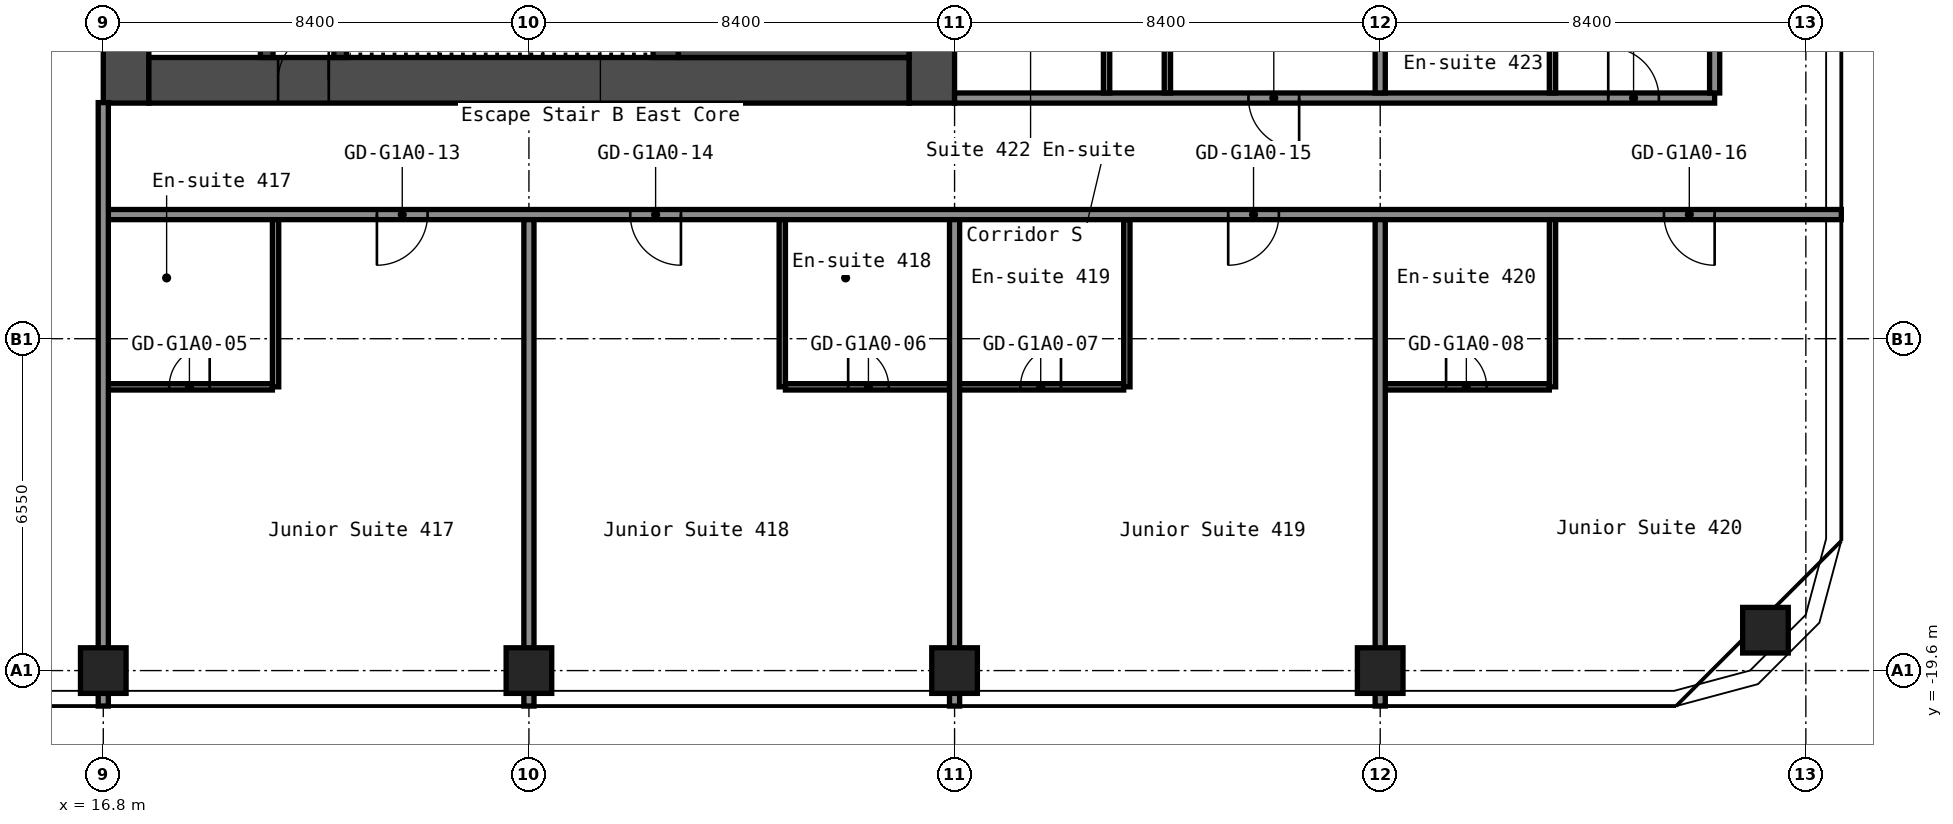
"""IFC4 building model, lengths in metres.
Left out: names, types, materials, properties, quantities, classifications, styles, units other than length and angle.
Written with IfcOpenShell. Run it as: python <this file> out.ifc"""

import sys

from ifc_helpers import new_model, si_unit, direction, frame, frame_2d, origin, origin_2d, place, context, subcontext, project, spatial, rectangle, hollow_rectangle, extrude, element, fill, save


model = new_model("IFC4")
c1 = context("Model", 3, precision=1e-05, world=origin(), true_north=direction((0.0, 1.0)))
c2 = subcontext(c1, "Body", "Model", "MODEL_VIEW")
j1 = project(units=[si_unit("LENGTHUNIT", "METRE"), si_unit("PLANEANGLEUNIT", "RADIAN")], contexts=[c1])
p1 = place(None, origin())
s1 = spatial("IfcSite", under=j1, at=p1, CompositionType="ELEMENT")
p2 = place(p1, origin())
s2 = spatial("IfcBuilding", under=s1, at=p2, CompositionType="ELEMENT")
p3 = place(p2, frame((0.0, 0.0, 19.8)))
s3 = spatial("IfcBuildingStorey", under=s2, at=p3, CompositionType="ELEMENT", Elevation=19.8)
for number, where, z_axis, x_axis in (
    (1, (16.8, -19.6, 0.0), (0.0, 0.0, 1.0), (1.0, 0.0, 0.0)),
    (2, (25.2, -19.6, 0.0), (0.0, 0.0, 1.0), (1.0, 0.0, 0.0)),
    (3, (33.6, -19.6, 0.0), (0.0, 0.0, 1.0), (1.0, 0.0, 0.0)),
    (4, (42.0, -19.6, 0.0), (0.0, 0.0, 1.0), (1.0, 0.0, 0.0)),
    (5, (49.603, -18.803, 0.0), (0.0, 0.0, 1.0), (1.0, 0.0, 0.0)),
):
    element("IfcColumn", number, at=place(p3, frame(where, z_axis=z_axis, x_axis=x_axis)), inside=s3, PredefinedType="COLUMN", context=c2, shape_type="SweptSolid", body=[
        extrude(hollow_rectangle(XDim=0.9, YDim=0.9, WallThickness=0.036, at=origin_2d()), origin(), (0.0, 0.0, 1.0), 2.8),
    ])
p4 = place(p3, frame((17.25, -8.4, 0.0), z_axis=(0.0, 0.0, 1.0), x_axis=(0.0, 1.0, 0.0)))
e6 = element("IfcWall", 6, at=p4, inside=s3, PredefinedType="SHEAR", context=c2, shape_type="SweptSolid", body=[
    extrude(rectangle(XDim=16.8, YDim=0.9, at=frame_2d((8.4, 0.0))), origin(), (0.0, 0.0, 1.0), 2.8),
])
p5 = place(p4, frame((12.75, 0.0, 0.0)))
e7 = element("IfcOpeningElement", 7, at=p5, cuts=e6, PredefinedType="OPENING", context=c2, shape_type="SweptSolid", body=[
    extrude(rectangle(XDim=1.2, YDim=2.1, at=frame_2d((0.6, 1.05))), frame((0.0, 0.46, 0.0), z_axis=(0.0, -1.0, 0.0), x_axis=(1.0, 0.0, 0.0)), (0.0, 0.0, 1.0), 0.92),
])
p6 = place(p4, frame((2.85, 0.0, 0.0)))
e8 = element("IfcOpeningElement", 8, at=p6, cuts=e6, PredefinedType="OPENING", context=c2, shape_type="SweptSolid", body=[
    extrude(rectangle(XDim=1.2, YDim=2.1, at=frame_2d((0.6, 1.05))), frame((0.0, 0.46, 0.0), z_axis=(0.0, -1.0, 0.0), x_axis=(1.0, 0.0, 0.0)), (0.0, 0.0, 1.0), 0.92),
])
p7 = place(p3, frame((33.15, -8.4, 0.0), z_axis=(0.0, 0.0, 1.0), x_axis=(0.0, 1.0, 0.0)))
e9 = element("IfcWall", 9, at=p7, inside=s3, PredefinedType="SHEAR", context=c2, shape_type="SweptSolid", body=[
    extrude(rectangle(XDim=16.8, YDim=0.9, at=frame_2d((8.4, 0.0))), origin(), (0.0, 0.0, 1.0), 2.8),
])
p8 = place(p3, frame((17.7, -7.95, 0.0), z_axis=(0.0, 0.0, 1.0), x_axis=(1.0, 0.0, 0.0)))
e10 = element("IfcWall", 10, at=p8, inside=s3, PredefinedType="SHEAR", context=c2, shape_type="SweptSolid", body=[
    extrude(rectangle(XDim=15.0, YDim=0.9, at=frame_2d((7.5, 0.0))), origin(), (0.0, 0.0, 1.0), 2.8),
])
p9 = place(p8, frame((2.55, 0.0, 0.0)))
e11 = element("IfcOpeningElement", 11, at=p9, cuts=e10, PredefinedType="OPENING", context=c2, shape_type="SweptSolid", body=[
    extrude(rectangle(XDim=1.0, YDim=2.1, at=frame_2d((0.5, 1.05))), frame((0.0, 0.46, 0.0), z_axis=(0.0, -1.0, 0.0), x_axis=(1.0, 0.0, 0.0)), (0.0, 0.0, 1.0), 0.92),
])
p10 = place(p3, frame((20.025, -7.5, 0.0), z_axis=(0.0, 0.0, 1.0), x_axis=(0.0, 1.0, 0.0)))
e12 = element("IfcWall", 12, at=p10, inside=s3, PredefinedType="SHEAR", context=c2, shape_type="SweptSolid", body=[
    extrude(rectangle(XDim=6.3, YDim=0.25, at=frame_2d((3.15, 0.0))), origin(), (0.0, 0.0, 1.0), 2.8),
])
p11 = place(p10, frame((2.4, 0.0, 0.0)))
e13 = element("IfcOpeningElement", 13, at=p11, cuts=e12, PredefinedType="OPENING", context=c2, shape_type="SweptSolid", body=[
    extrude(rectangle(XDim=1.0, YDim=2.1, at=frame_2d((0.5, 1.05))), frame((0.0, 0.135, 0.0), z_axis=(0.0, -1.0, 0.0), x_axis=(1.0, 0.0, 0.0)), (0.0, 0.0, 1.0), 0.27),
])
p12 = place(p3, frame((21.475, -7.5, 0.0), z_axis=(0.0, 0.0, 1.0), x_axis=(0.0, 1.0, 0.0)))
e14 = element("IfcWall", 14, at=p12, inside=s3, PredefinedType="SHEAR", context=c2, shape_type="SweptSolid", body=[
    extrude(rectangle(XDim=3.75, YDim=0.25, at=frame_2d((1.875, 0.0))), origin(), (0.0, 0.0, 1.0), 2.8),
])
p13 = place(p12, frame((1.3, 0.0, 0.0)))
e15 = element("IfcOpeningElement", 15, at=p13, cuts=e14, PredefinedType="OPENING", context=c2, shape_type="SweptSolid", body=[
    extrude(rectangle(XDim=1.2, YDim=2.1, at=frame_2d((0.6, 1.05))), frame((0.0, 0.135, 0.0), z_axis=(0.0, -1.0, 0.0), x_axis=(1.0, 0.0, 0.0)), (0.0, 0.0, 1.0), 0.27),
])
p14 = place(p3, frame((27.9, -7.5, 0.0), z_axis=(0.0, 0.0, 1.0), x_axis=(0.0, 1.0, 0.0)))
e16 = element("IfcWall", 16, at=p14, inside=s3, PredefinedType="SHEAR", context=c2, shape_type="SweptSolid", body=[
    extrude(rectangle(XDim=3.75, YDim=0.5, at=frame_2d((1.875, 0.0))), origin(), (0.0, 0.0, 1.0), 2.8),
])
p15 = place(p3, frame((28.15, -6.75, 0.0), z_axis=(0.0, 0.0, 1.0), x_axis=(1.0, 0.0, 0.0)))
e17 = element("IfcWall", 17, at=p15, inside=s3, PredefinedType="SHEAR", context=c2, shape_type="SweptSolid", body=[
    extrude(rectangle(XDim=4.55, YDim=1.5, at=frame_2d((2.275, 0.0))), origin(), (0.0, 0.0, 1.0), 2.8),
])
p16 = place(p3, frame((16.9, -14.0, 0.0), z_axis=(0.0, 0.0, 1.0), x_axis=(1.0, 0.0, 0.0)))
e18 = element("IfcWall", 18, at=p16, inside=s3, PredefinedType="PARTITIONING", context=c2, shape_type="SweptSolid", body=[
    extrude(rectangle(XDim=3.238, YDim=0.125, at=frame_2d((1.619, 0.0))), origin(), (0.0, 0.0, 1.0), 2.8),
])
p17 = place(p16, frame((1.2, 0.0, 0.0)))
e19 = element("IfcOpeningElement", 19, at=p17, cuts=e18, PredefinedType="OPENING", context=c2, shape_type="SweptSolid", body=[
    extrude(rectangle(XDim=0.8, YDim=2.1, at=frame_2d((0.4, 1.05))), frame((0.0, 0.073, 0.0), z_axis=(0.0, -1.0, 0.0), x_axis=(1.0, 0.0, 0.0)), (0.0, 0.0, 1.0), 0.145),
])
p18 = place(p3, frame((30.262, -14.0, 0.0), z_axis=(0.0, 0.0, 1.0), x_axis=(1.0, 0.0, 0.0)))
e20 = element("IfcWall", 20, at=p18, inside=s3, PredefinedType="PARTITIONING", context=c2, shape_type="SweptSolid", body=[
    extrude(rectangle(XDim=6.675, YDim=0.125, at=frame_2d((3.337, 0.0))), origin(), (0.0, 0.0, 1.0), 2.8),
])
p19 = place(p18, frame((1.238, 0.0, 0.0)))
e21 = element("IfcOpeningElement", 21, at=p19, cuts=e20, PredefinedType="OPENING", context=c2, shape_type="SweptSolid", body=[
    extrude(rectangle(XDim=0.8, YDim=2.1, at=frame_2d((0.4, 1.05))), frame((0.0, 0.073, 0.0), z_axis=(0.0, -1.0, 0.0), x_axis=(1.0, 0.0, 0.0)), (0.0, 0.0, 1.0), 0.145),
])
p20 = place(p18, frame((4.637, 0.0, 0.0)))
e22 = element("IfcOpeningElement", 22, at=p20, cuts=e20, PredefinedType="OPENING", context=c2, shape_type="SweptSolid", body=[
    extrude(rectangle(XDim=0.8, YDim=2.1, at=frame_2d((0.4, 1.05))), frame((0.0, 0.073, 0.0), z_axis=(0.0, -1.0, 0.0), x_axis=(1.0, 0.0, 0.0)), (0.0, 0.0, 1.0), 0.145),
])
p21 = place(p3, frame((42.1, -14.0, 0.0), z_axis=(0.0, 0.0, 1.0), x_axis=(1.0, 0.0, 0.0)))
e23 = element("IfcWall", 23, at=p21, inside=s3, PredefinedType="PARTITIONING", context=c2, shape_type="SweptSolid", body=[
    extrude(rectangle(XDim=3.237, YDim=0.125, at=frame_2d((1.619, 0.0))), origin(), (0.0, 0.0, 1.0), 2.8),
])
p22 = place(p21, frame((1.2, 0.0, 0.0)))
e24 = element("IfcOpeningElement", 24, at=p22, cuts=e23, PredefinedType="OPENING", context=c2, shape_type="SweptSolid", body=[
    extrude(rectangle(XDim=0.8, YDim=2.1, at=frame_2d((0.4, 1.05))), frame((0.0, 0.073, 0.0), z_axis=(0.0, -1.0, 0.0), x_axis=(1.0, 0.0, 0.0)), (0.0, 0.0, 1.0), 0.145),
])
p23 = place(p3, frame((16.8, -10.6, 0.0), z_axis=(0.0, 0.0, 1.0), x_axis=(1.0, 0.0, 0.0)))
e25 = element("IfcWall", 25, at=p23, inside=s3, PredefinedType="PARTITIONING", context=c2, shape_type="SweptSolid", body=[
    extrude(rectangle(XDim=34.3, YDim=0.2, at=frame_2d((17.15, 0.0))), origin(), (0.0, 0.0, 1.0), 2.8),
])
p24 = place(p23, frame((5.4, 0.0, 0.0)))
e26 = element("IfcOpeningElement", 26, at=p24, cuts=e25, PredefinedType="OPENING", context=c2, shape_type="SweptSolid", body=[
    extrude(rectangle(XDim=1.0, YDim=2.1, at=frame_2d((0.5, 1.05))), frame((0.0, 0.11, 0.0), z_axis=(0.0, -1.0, 0.0), x_axis=(1.0, 0.0, 0.0)), (0.0, 0.0, 1.0), 0.22),
])
p25 = place(p23, frame((10.4, 0.0, 0.0)))
e27 = element("IfcOpeningElement", 27, at=p25, cuts=e25, PredefinedType="OPENING", context=c2, shape_type="SweptSolid", body=[
    extrude(rectangle(XDim=1.0, YDim=2.1, at=frame_2d((0.5, 1.05))), frame((0.0, 0.11, 0.0), z_axis=(0.0, -1.0, 0.0), x_axis=(1.0, 0.0, 0.0)), (0.0, 0.0, 1.0), 0.22),
])
p26 = place(p23, frame((22.2, 0.0, 0.0)))
e28 = element("IfcOpeningElement", 28, at=p26, cuts=e25, PredefinedType="OPENING", context=c2, shape_type="SweptSolid", body=[
    extrude(rectangle(XDim=1.0, YDim=2.1, at=frame_2d((0.5, 1.05))), frame((0.0, 0.11, 0.0), z_axis=(0.0, -1.0, 0.0), x_axis=(1.0, 0.0, 0.0)), (0.0, 0.0, 1.0), 0.22),
])
p27 = place(p23, frame((30.8, 0.0, 0.0)))
e29 = element("IfcOpeningElement", 29, at=p27, cuts=e25, PredefinedType="OPENING", context=c2, shape_type="SweptSolid", body=[
    extrude(rectangle(XDim=1.0, YDim=2.1, at=frame_2d((0.5, 1.05))), frame((0.0, 0.11, 0.0), z_axis=(0.0, -1.0, 0.0), x_axis=(1.0, 0.0, 0.0)), (0.0, 0.0, 1.0), 0.22),
])
p28 = place(p3, frame((33.6, -8.3, 0.0), z_axis=(0.0, 0.0, 1.0), x_axis=(1.0, 0.0, 0.0)))
e30 = element("IfcWall", 30, at=p28, inside=s3, PredefinedType="PARTITIONING", context=c2, shape_type="SweptSolid", body=[
    extrude(rectangle(XDim=15.0, YDim=0.2, at=frame_2d((7.5, 0.0))), origin(), (0.0, 0.0, 1.0), 2.8),
])
p29 = place(p28, frame((5.8, 0.0, 0.0)))
e31 = element("IfcOpeningElement", 31, at=p29, cuts=e30, PredefinedType="OPENING", context=c2, shape_type="SweptSolid", body=[
    extrude(rectangle(XDim=1.0, YDim=2.1, at=frame_2d((0.5, 1.05))), frame((0.0, 0.11, 0.0), z_axis=(0.0, -1.0, 0.0), x_axis=(1.0, 0.0, 0.0)), (0.0, 0.0, 1.0), 0.22),
])
p30 = place(p28, frame((12.9, 0.0, 0.0)))
e32 = element("IfcOpeningElement", 32, at=p30, cuts=e30, PredefinedType="OPENING", context=c2, shape_type="SweptSolid", body=[
    extrude(rectangle(XDim=1.0, YDim=2.1, at=frame_2d((0.5, 1.05))), frame((0.0, 0.11, 0.0), z_axis=(0.0, -1.0, 0.0), x_axis=(1.0, 0.0, 0.0)), (0.0, 0.0, 1.0), 0.22),
])
p31 = place(p3, frame((16.8, -20.3, 0.0), z_axis=(0.0, 0.0, 1.0), x_axis=(0.0, 1.0, 0.0)))
e33 = element("IfcWall", 33, at=p31, inside=s3, PredefinedType="PARTITIONING", context=c2, shape_type="SweptSolid", body=[
    extrude(rectangle(XDim=11.91, YDim=0.2, at=frame_2d((5.955, 0.0))), origin(), (0.0, 0.0, 1.0), 2.8),
])
p32 = place(p3, frame((20.2, -14.0, 0.0), z_axis=(0.0, 0.0, 1.0), x_axis=(0.0, 1.0, 0.0)))
e34 = element("IfcWall", 34, at=p32, inside=s3, PredefinedType="PARTITIONING", context=c2, shape_type="SweptSolid", body=[
    extrude(rectangle(XDim=3.3, YDim=0.125, at=frame_2d((1.65, 0.0))), origin(), (0.0, 0.0, 1.0), 2.8),
])
p33 = place(p3, frame((25.2, -20.3, 0.0), z_axis=(0.0, 0.0, 1.0), x_axis=(0.0, 1.0, 0.0)))
e35 = element("IfcWall", 35, at=p33, inside=s3, PredefinedType="PARTITIONING", context=c2, shape_type="SweptSolid", body=[
    extrude(rectangle(XDim=9.6, YDim=0.2, at=frame_2d((4.8, 0.0))), origin(), (0.0, 0.0, 1.0), 2.8),
])
p34 = place(p3, frame((30.2, -14.0, 0.0), z_axis=(0.0, 0.0, 1.0), x_axis=(0.0, 1.0, 0.0)))
e36 = element("IfcWall", 36, at=p34, inside=s3, PredefinedType="PARTITIONING", context=c2, shape_type="SweptSolid", body=[
    extrude(rectangle(XDim=3.3, YDim=0.125, at=frame_2d((1.65, 0.0))), origin(), (0.0, 0.0, 1.0), 2.8),
])
p35 = place(p3, frame((33.6, -20.3, 0.0), z_axis=(0.0, 0.0, 1.0), x_axis=(0.0, 1.0, 0.0)))
e37 = element("IfcWall", 37, at=p35, inside=s3, PredefinedType="PARTITIONING", context=c2, shape_type="SweptSolid", body=[
    extrude(rectangle(XDim=9.6, YDim=0.2, at=frame_2d((4.8, 0.0))), origin(), (0.0, 0.0, 1.0), 2.8),
])
p36 = place(p3, frame((36.6, -8.2, 0.0), z_axis=(0.0, 0.0, 1.0), x_axis=(0.0, 1.0, 0.0)))
e38 = element("IfcWall", 38, at=p36, inside=s3, PredefinedType="PARTITIONING", context=c2, shape_type="SweptSolid", body=[
    extrude(rectangle(XDim=3.1, YDim=0.125, at=frame_2d((1.55, 0.0))), origin(), (0.0, 0.0, 1.0), 2.8),
])
p37 = place(p3, frame((37.0, -14.0, 0.0), z_axis=(0.0, 0.0, 1.0), x_axis=(0.0, 1.0, 0.0)))
e39 = element("IfcWall", 39, at=p37, inside=s3, PredefinedType="PARTITIONING", context=c2, shape_type="SweptSolid", body=[
    extrude(rectangle(XDim=3.3, YDim=0.125, at=frame_2d((1.65, 0.0))), origin(), (0.0, 0.0, 1.0), 2.8),
])
p38 = place(p3, frame((37.8, -8.2, 0.0), z_axis=(0.0, 0.0, 1.0), x_axis=(0.0, 1.0, 0.0)))
e40 = element("IfcWall", 40, at=p38, inside=s3, PredefinedType="PARTITIONING", context=c2, shape_type="SweptSolid", body=[
    extrude(rectangle(XDim=8.1, YDim=0.125, at=frame_2d((4.05, 0.0))), origin(), (0.0, 0.0, 1.0), 2.8),
])
p39 = place(p38, frame((4.05, 0.0, 0.0)))
e41 = element("IfcOpeningElement", 41, at=p39, cuts=e40, PredefinedType="OPENING", context=c2, shape_type="SweptSolid", body=[
    extrude(rectangle(XDim=0.9, YDim=2.1, at=frame_2d((0.45, 1.05))), frame((0.0, 0.073, 0.0), z_axis=(0.0, -1.0, 0.0), x_axis=(1.0, 0.0, 0.0)), (0.0, 0.0, 1.0), 0.145),
])
p40 = place(p3, frame((42.0, -20.3, 0.0), z_axis=(0.0, 0.0, 1.0), x_axis=(0.0, 1.0, 0.0)))
e42 = element("IfcWall", 42, at=p40, inside=s3, PredefinedType="PARTITIONING", context=c2, shape_type="SweptSolid", body=[
    extrude(rectangle(XDim=9.6, YDim=0.2, at=frame_2d((4.8, 0.0))), origin(), (0.0, 0.0, 1.0), 2.8),
])
p41 = place(p3, frame((42.0, -8.2, 0.0), z_axis=(0.0, 0.0, 1.0), x_axis=(0.0, 1.0, 0.0)))
e43 = element("IfcWall", 43, at=p41, inside=s3, PredefinedType="PARTITIONING", context=c2, shape_type="SweptSolid", body=[
    extrude(rectangle(XDim=8.2, YDim=0.2, at=frame_2d((4.1, 0.0))), origin(), (0.0, 0.0, 1.0), 2.8),
])
for number, where, z_axis, x_axis in (
    (44, (45.4, -14.0, 0.0), (0.0, 0.0, 1.0), (0.0, 1.0, 0.0)),
    (45, (45.4, -8.2, 0.0), (0.0, 0.0, 1.0), (0.0, 1.0, 0.0)),
):
    element("IfcWall", number, at=place(p3, frame(where, z_axis=z_axis, x_axis=x_axis)), inside=s3, PredefinedType="PARTITIONING", context=c2, shape_type="SweptSolid", body=[
        extrude(rectangle(XDim=3.3, YDim=0.125, at=frame_2d((1.65, 0.0))), origin(), (0.0, 0.0, 1.0), 2.8),
    ])
p42 = place(p3, frame((48.6, -8.2, 0.0), z_axis=(0.0, 0.0, 1.0), x_axis=(0.0, 1.0, 0.0)))
e46 = element("IfcWall", 46, at=p42, inside=s3, PredefinedType="PARTITIONING", context=c2, shape_type="SweptSolid", body=[
    extrude(rectangle(XDim=16.4, YDim=0.2, at=frame_2d((8.2, 0.0))), origin(), (0.0, 0.0, 1.0), 2.8),
])
p43 = place(p9, origin())
e47 = element("IfcDoor", 47, at=p43, inside=s3, OperationType="SINGLE_SWING_LEFT", PredefinedType="DOOR", context=c2, shape_type="SweptSolid", body=[
    extrude(rectangle(XDim=1.0, YDim=2.1, at=frame_2d((0.5, 1.05))), frame((0.0, 0.025, 0.0), z_axis=(0.0, -1.0, 0.0), x_axis=(1.0, 0.0, 0.0)), (0.0, 0.0, 1.0), 0.05),
])
fill(e11, e47)
p44 = place(p17, origin())
e48 = element("IfcDoor", 48, at=p44, inside=s3, OperationType="SINGLE_SWING_LEFT", PredefinedType="DOOR", context=c2, shape_type="SweptSolid", body=[
    extrude(rectangle(XDim=0.8, YDim=2.1, at=frame_2d((0.4, 1.05))), frame((0.0, 0.025, 0.0), z_axis=(0.0, -1.0, 0.0), x_axis=(1.0, 0.0, 0.0)), (0.0, 0.0, 1.0), 0.05),
])
fill(e19, e48)
p45 = place(p19, origin())
e49 = element("IfcDoor", 49, at=p45, inside=s3, OperationType="SINGLE_SWING_RIGHT", PredefinedType="DOOR", context=c2, shape_type="SweptSolid", body=[
    extrude(rectangle(XDim=0.8, YDim=2.1, at=frame_2d((0.4, 1.05))), frame((0.0, 0.025, 0.0), z_axis=(0.0, -1.0, 0.0), x_axis=(1.0, 0.0, 0.0)), (0.0, 0.0, 1.0), 0.05),
])
fill(e21, e49)
p46 = place(p20, origin())
e50 = element("IfcDoor", 50, at=p46, inside=s3, OperationType="SINGLE_SWING_LEFT", PredefinedType="DOOR", context=c2, shape_type="SweptSolid", body=[
    extrude(rectangle(XDim=0.8, YDim=2.1, at=frame_2d((0.4, 1.05))), frame((0.0, 0.025, 0.0), z_axis=(0.0, -1.0, 0.0), x_axis=(1.0, 0.0, 0.0)), (0.0, 0.0, 1.0), 0.05),
])
fill(e22, e50)
p47 = place(p22, origin())
e51 = element("IfcDoor", 51, at=p47, inside=s3, OperationType="SINGLE_SWING_RIGHT", PredefinedType="DOOR", context=c2, shape_type="SweptSolid", body=[
    extrude(rectangle(XDim=0.8, YDim=2.1, at=frame_2d((0.4, 1.05))), frame((0.0, 0.025, 0.0), z_axis=(0.0, -1.0, 0.0), x_axis=(1.0, 0.0, 0.0)), (0.0, 0.0, 1.0), 0.05),
])
fill(e24, e51)
p48 = place(p24, origin())
e52 = element("IfcDoor", 52, at=p48, inside=s3, OperationType="SINGLE_SWING_LEFT", PredefinedType="DOOR", context=c2, shape_type="SweptSolid", body=[
    extrude(rectangle(XDim=1.0, YDim=2.1, at=frame_2d((0.5, 1.05))), frame((0.0, 0.025, 0.0), z_axis=(0.0, -1.0, 0.0), x_axis=(1.0, 0.0, 0.0)), (0.0, 0.0, 1.0), 0.05),
])
fill(e26, e52)
p49 = place(p25, origin())
e53 = element("IfcDoor", 53, at=p49, inside=s3, OperationType="SINGLE_SWING_RIGHT", PredefinedType="DOOR", context=c2, shape_type="SweptSolid", body=[
    extrude(rectangle(XDim=1.0, YDim=2.1, at=frame_2d((0.5, 1.05))), frame((0.0, 0.025, 0.0), z_axis=(0.0, -1.0, 0.0), x_axis=(1.0, 0.0, 0.0)), (0.0, 0.0, 1.0), 0.05),
])
fill(e27, e53)
p50 = place(p26, origin())
e54 = element("IfcDoor", 54, at=p50, inside=s3, OperationType="SINGLE_SWING_LEFT", PredefinedType="DOOR", context=c2, shape_type="SweptSolid", body=[
    extrude(rectangle(XDim=1.0, YDim=2.1, at=frame_2d((0.5, 1.05))), frame((0.0, 0.025, 0.0), z_axis=(0.0, -1.0, 0.0), x_axis=(1.0, 0.0, 0.0)), (0.0, 0.0, 1.0), 0.05),
])
fill(e28, e54)
p51 = place(p27, origin())
e55 = element("IfcDoor", 55, at=p51, inside=s3, OperationType="SINGLE_SWING_RIGHT", PredefinedType="DOOR", context=c2, shape_type="SweptSolid", body=[
    extrude(rectangle(XDim=1.0, YDim=2.1, at=frame_2d((0.5, 1.05))), frame((0.0, 0.025, 0.0), z_axis=(0.0, -1.0, 0.0), x_axis=(1.0, 0.0, 0.0)), (0.0, 0.0, 1.0), 0.05),
])
fill(e29, e55)
p52 = place(p29, origin())
e56 = element("IfcDoor", 56, at=p52, inside=s3, OperationType="SINGLE_SWING_RIGHT", PredefinedType="DOOR", context=c2, shape_type="SweptSolid", body=[
    extrude(rectangle(XDim=1.0, YDim=2.1, at=frame_2d((0.5, 1.05))), frame((0.0, 0.025, 0.0), z_axis=(0.0, -1.0, 0.0), x_axis=(1.0, 0.0, 0.0)), (0.0, 0.0, 1.0), 0.05),
])
fill(e31, e56)
p53 = place(p30, origin())
e57 = element("IfcDoor", 57, at=p53, inside=s3, OperationType="SINGLE_SWING_RIGHT", PredefinedType="DOOR", context=c2, shape_type="SweptSolid", body=[
    extrude(rectangle(XDim=1.0, YDim=2.1, at=frame_2d((0.5, 1.05))), frame((0.0, 0.025, 0.0), z_axis=(0.0, -1.0, 0.0), x_axis=(1.0, 0.0, 0.0)), (0.0, 0.0, 1.0), 0.05),
])
fill(e32, e57)
save(model, sys.argv[1])
